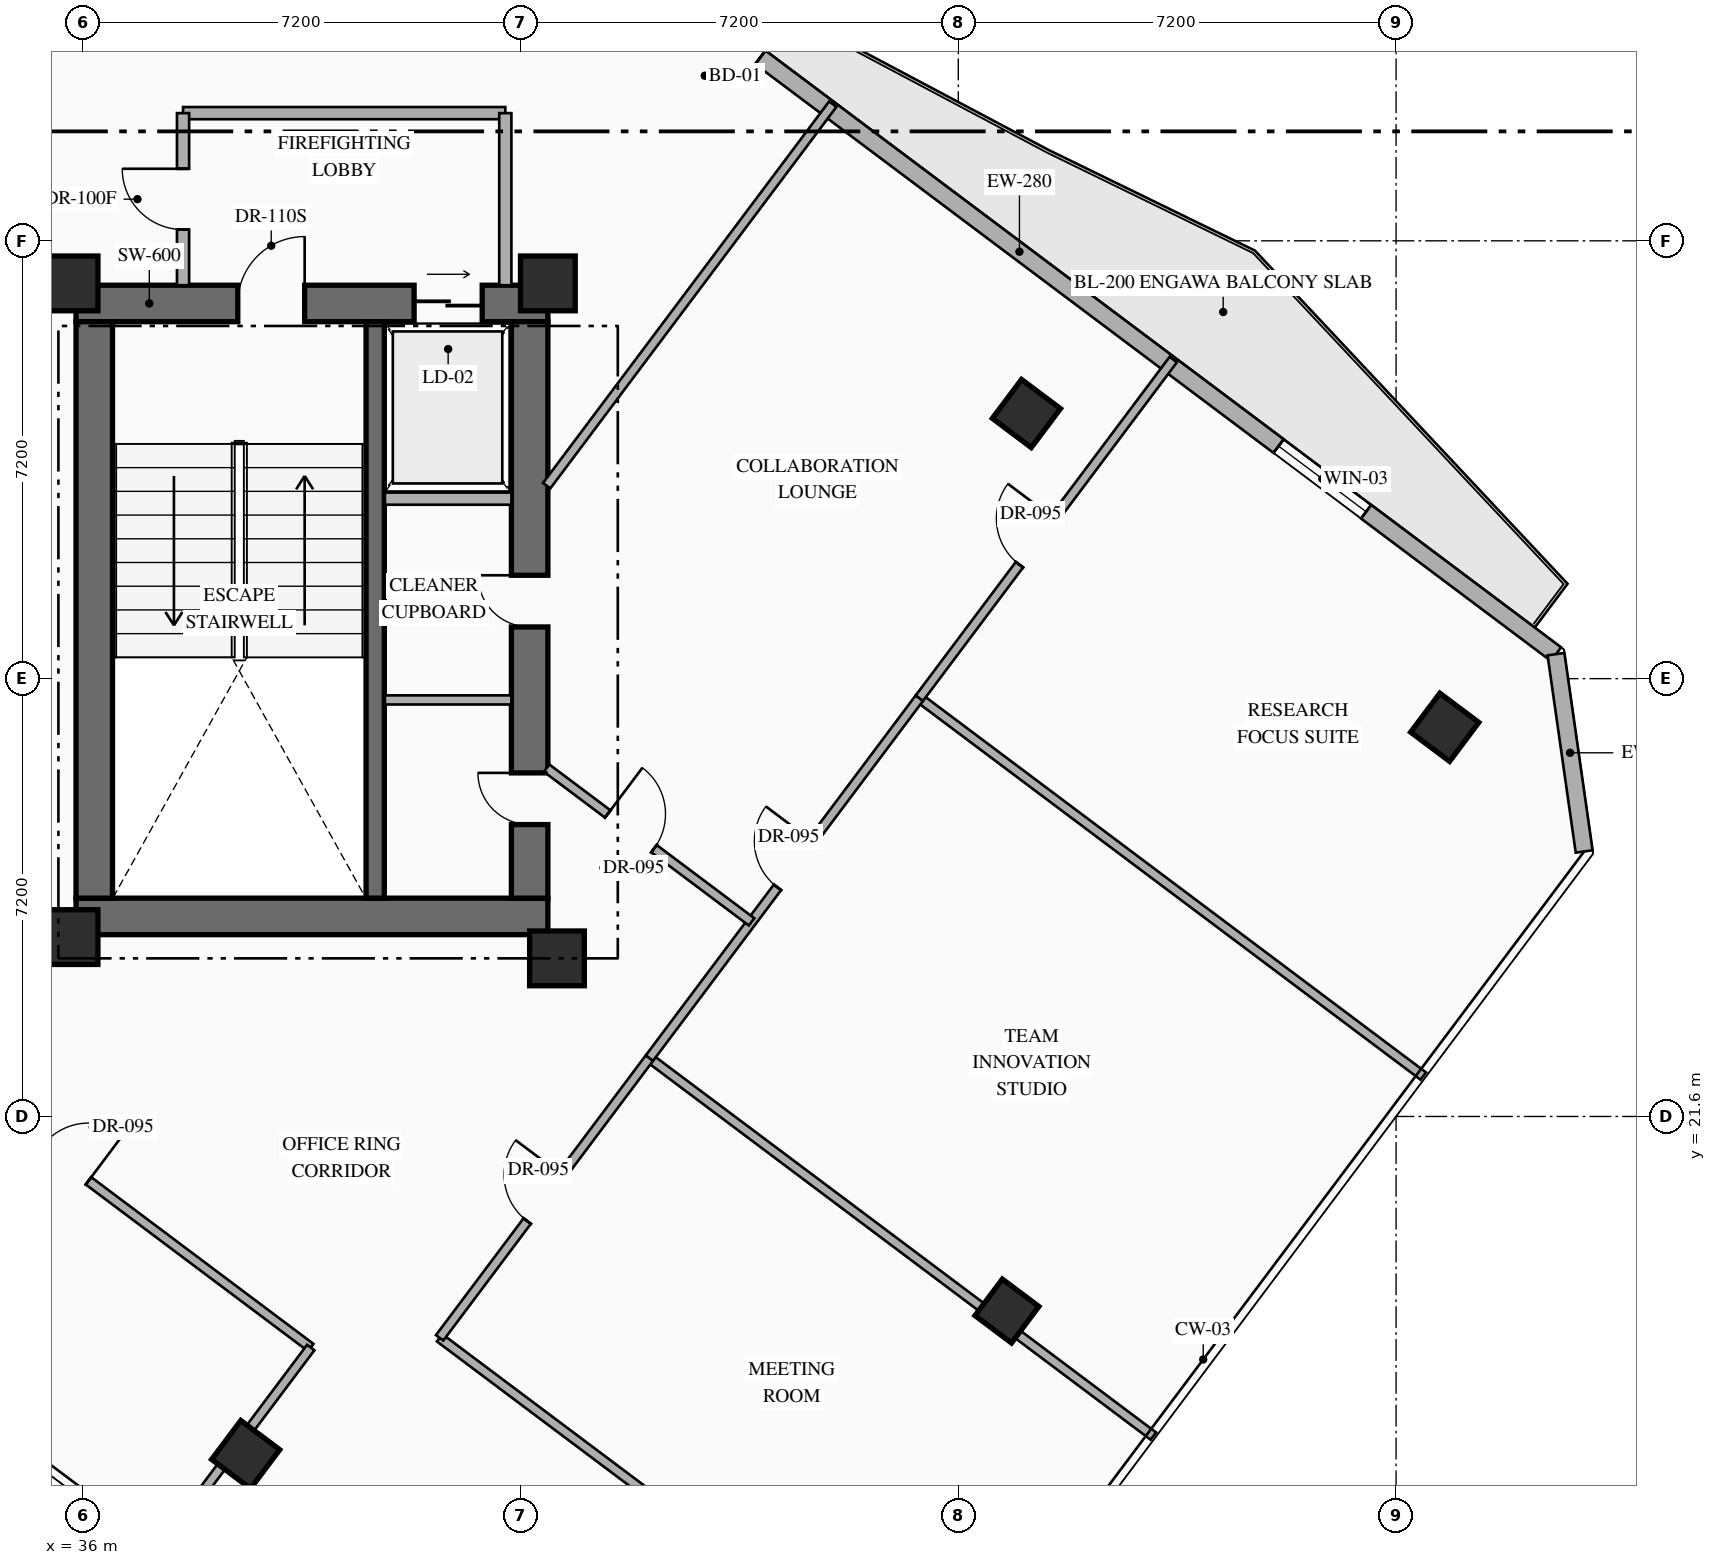
"""IFC4 building model, lengths in metres.
Left out: names, types, materials, properties, quantities, classifications, styles, units other than length and angle.
Written with IfcOpenShell. Run it as: python <this file> out.ifc"""

import sys

from ifc_helpers import new_model, si_unit, direction, frame, frame_2d, origin, origin_2d, place, context, subcontext, project, spatial, rectangle, hollow_rectangle, extrude, element, fill, save


model = new_model("IFC4")
c1 = context("Model", 3, precision=1e-05, world=origin(), true_north=direction((0.0, 1.0)))
c2 = subcontext(c1, "Body", "Model", "MODEL_VIEW")
j1 = project(units=[si_unit("LENGTHUNIT", "METRE"), si_unit("PLANEANGLEUNIT", "RADIAN")], contexts=[c1])
p1 = place(None, origin())
s1 = spatial("IfcSite", under=j1, at=p1, CompositionType="ELEMENT")
p2 = place(p1, origin())
s2 = spatial("IfcBuilding", under=s1, at=p2, CompositionType="ELEMENT")
p3 = place(p2, frame((0.0, 0.0, 178.05)))
s3 = spatial("IfcBuildingStorey", under=s2, at=p3, CompositionType="ELEMENT", Elevation=178.05)
p4 = place(p3, frame((35.89, 24.89, 0.0), z_axis=(0.0, 0.0, 1.0), x_axis=(1.0, 0.0, 0.0)))
e1 = element("IfcWall", 1, at=p4, inside=s3, PredefinedType="SHEAR", context=c2, shape_type="SweptSolid", body=[
    extrude(rectangle(XDim=7.76, YDim=0.6, at=frame_2d((3.88, 0.0))), origin(), (0.0, 0.0, 1.0), 3.6),
])
p5 = place(p3, frame((35.89, 34.97, 0.0), z_axis=(0.0, 0.0, 1.0), x_axis=(1.0, 0.0, 0.0)))
e2 = element("IfcWall", 2, at=p5, inside=s3, PredefinedType="SHEAR", context=c2, shape_type="SweptSolid", body=[
    extrude(rectangle(XDim=7.76, YDim=0.6, at=frame_2d((3.88, 0.0))), origin(), (0.0, 0.0, 1.0), 3.6),
])
p6 = place(p5, frame((2.66, 0.0, 0.0)))
e3 = element("IfcOpeningElement", 3, at=p6, cuts=e2, PredefinedType="OPENING", context=c2, shape_type="SweptSolid", body=[
    extrude(rectangle(XDim=1.1, YDim=2.2, at=frame_2d((0.55, 1.1))), frame((0.0, 0.31, 0.0), z_axis=(0.0, -1.0, 0.0), x_axis=(1.0, 0.0, 0.0)), (0.0, 0.0, 1.0), 0.62),
])
p7 = place(p5, frame((5.56, 0.0, 0.0)))
e4 = element("IfcOpeningElement", 4, at=p7, cuts=e2, PredefinedType="OPENING", context=c2, shape_type="SweptSolid", body=[
    extrude(rectangle(XDim=1.12, YDim=2.15, at=frame_2d((0.56, 1.075))), frame((0.0, 0.31, 0.0), z_axis=(0.0, -1.0, 0.0), x_axis=(1.0, 0.0, 0.0)), (0.0, 0.0, 1.0), 0.62),
])
p8 = place(p3, frame((36.19, 25.19, 0.0), z_axis=(0.0, 0.0, 1.0), x_axis=(0.0, 1.0, 0.0)))
e5 = element("IfcWall", 5, at=p8, inside=s3, PredefinedType="SHEAR", context=c2, shape_type="SweptSolid", body=[
    extrude(rectangle(XDim=9.48, YDim=0.6, at=frame_2d((4.74, 0.0))), origin(), (0.0, 0.0, 1.0), 3.6),
])
p9 = place(p3, frame((43.35, 25.19, 0.0), z_axis=(0.0, 0.0, 1.0), x_axis=(0.0, 1.0, 0.0)))
e6 = element("IfcWall", 6, at=p9, inside=s3, PredefinedType="SHEAR", context=c2, shape_type="SweptSolid", body=[
    extrude(rectangle(XDim=9.48, YDim=0.6, at=frame_2d((4.74, 0.0))), origin(), (0.0, 0.0, 1.0), 3.6),
])
p10 = place(p9, frame((1.21, 0.0, 0.0)))
e7 = element("IfcOpeningElement", 7, at=p10, cuts=e6, PredefinedType="OPENING", context=c2, shape_type="SweptSolid", body=[
    extrude(rectangle(XDim=0.85, YDim=2.08, at=frame_2d((0.425, 1.04))), frame((0.0, 0.31, 0.0), z_axis=(0.0, -1.0, 0.0), x_axis=(1.0, 0.0, 0.0)), (0.0, 0.0, 1.0), 0.62),
])
p11 = place(p9, frame((4.46, 0.0, 0.0)))
e8 = element("IfcOpeningElement", 8, at=p11, cuts=e6, PredefinedType="OPENING", context=c2, shape_type="SweptSolid", body=[
    extrude(rectangle(XDim=0.85, YDim=2.08, at=frame_2d((0.425, 1.04))), frame((0.0, 0.31, 0.0), z_axis=(0.0, -1.0, 0.0), x_axis=(1.0, 0.0, 0.0)), (0.0, 0.0, 1.0), 0.62),
])
p12 = place(p3, frame((40.81, 25.19, 0.0), z_axis=(0.0, 0.0, 1.0), x_axis=(0.0, 1.0, 0.0)))
e9 = element("IfcWall", 9, at=p12, inside=s3, PredefinedType="SHEAR", context=c2, shape_type="SweptSolid", body=[
    extrude(rectangle(XDim=9.48, YDim=0.3, at=frame_2d((4.74, 0.0))), origin(), (0.0, 0.0, 1.0), 3.6),
])
for number, where, z_axis, x_axis in (
    (10, (35.8, 24.55, 0.0), (0.0, 0.0, 1.0), (1.0, 0.0, 0.0)),
    (11, (43.8, 24.2, 0.0), (0.0, 0.0, 1.0), (1.0, 0.0, 0.0)),
    (12, (35.8, 35.3, 0.0), (0.0, 0.0, 1.0), (1.0, 0.0, 0.0)),
    (13, (43.65, 35.3, 0.0), (0.0, 0.0, 1.0), (1.0, 0.0, 0.0)),
):
    element("IfcColumn", number, at=place(p3, frame(where, z_axis=z_axis, x_axis=x_axis)), inside=s3, PredefinedType="COLUMN", context=c2, shape_type="SweptSolid", body=[
        extrude(rectangle(XDim=0.9, YDim=0.9, at=origin_2d()), origin(), (0.0, 0.0, 1.0), 3.6),
    ])
for number, where, z_axis, x_axis in (
    (14, (38.68, 16.04, 0.0), (0.0, 0.0, 1.0), (0.8, -0.6, 0.0)),
    (15, (51.52, 33.16, 0.0), (0.0, 0.0, 1.0), (0.8, -0.6, 0.0)),
    (16, (58.4, 28.0, 0.0), (0.0, 0.0, 1.0), (0.8, -0.6, 0.0)),
):
    element("IfcColumn", number, at=place(p3, frame(where, z_axis=z_axis, x_axis=x_axis)), inside=s3, PredefinedType="COLUMN", context=c2, shape_type="SweptSolid", body=[
        extrude(hollow_rectangle(XDim=0.8, YDim=0.8, WallThickness=0.032, at=origin_2d()), origin(), (0.0, 0.0, 1.0), 3.6),
    ])
p13 = place(p3, frame((51.2, 18.4, 0.0), z_axis=(0.0, 0.0, 1.0), x_axis=(0.799999996291, -0.600000004945, 0.0)))
e17 = element("IfcColumn", 17, at=p13, inside=s3, PredefinedType="COLUMN", context=c2, shape_type="SweptSolid", body=[
    extrude(hollow_rectangle(XDim=0.75, YDim=0.75, WallThickness=0.028, at=origin_2d()), origin(), (0.0, 0.0, 1.0), 3.6),
])
p14 = place(p3, frame((44.86, 40.73, 0.0), z_axis=(0.0, 0.0, 1.0), x_axis=(0.800007624502, -0.599989833863, 0.0)))
e18 = element("IfcWall", 18, at=p14, inside=s3, PredefinedType="STANDARD", context=c2, shape_type="SweptSolid", body=[
    extrude(rectangle(XDim=19.212, YDim=0.28, at=frame_2d((9.606, 0.0))), origin(), (0.0, 0.0, 1.0), 3.3),
])
p15 = place(p14, frame((1.755, 0.0, 0.0)))
e19 = element("IfcOpeningElement", 19, at=p15, cuts=e18, PredefinedType="OPENING", context=c2, shape_type="SweptSolid", body=[
    extrude(rectangle(XDim=1.1, YDim=2.2, at=frame_2d((0.55, 1.1))), frame((0.0, 0.15, 0.0), z_axis=(0.0, -1.0, 0.0), x_axis=(1.0, 0.0, 0.0)), (0.0, 0.0, 1.0), 0.3),
])
p16 = place(p14, frame((13.509, 0.0, 0.85)))
e20 = element("IfcOpeningElement", 20, at=p16, cuts=e18, PredefinedType="OPENING", context=c2, shape_type="SweptSolid", body=[
    extrude(rectangle(XDim=1.8, YDim=2.1, at=frame_2d((0.9, 1.05))), frame((0.0, 0.15, 0.0), z_axis=(0.0, -1.0, 0.0), x_axis=(1.0, 0.0, 0.0)), (0.0, 0.0, 1.0), 0.3),
])
p17 = place(p3, frame((60.23, 29.203, 0.0), z_axis=(0.0, 0.0, 1.0), x_axis=(0.141296221922, -0.989967361922, 0.0)))
e21 = element("IfcWall", 21, at=p17, inside=s3, PredefinedType="STANDARD", context=c2, shape_type="SweptSolid", body=[
    extrude(rectangle(XDim=3.278, YDim=0.28, at=frame_2d((1.639, 0.0))), origin(), (0.0, 0.0, 1.0), 3.3),
])
p18 = place(p3, frame((40.97, 31.76, 0.0), z_axis=(0.0, 0.0, 1.0), x_axis=(1.0, 0.0, 0.0)))
e22 = element("IfcWall", 22, at=p18, inside=s3, PredefinedType="STANDARD", context=c2, shape_type="SweptSolid", body=[
    extrude(rectangle(XDim=2.08, YDim=0.2, at=frame_2d((1.04, 0.0))), origin(), (0.0, 0.0, 1.0), 3.3),
])
p19 = place(p3, frame((40.97, 28.45, 0.0), z_axis=(0.0, 0.0, 1.0), x_axis=(1.0, 0.0, 0.0)))
e23 = element("IfcWall", 23, at=p19, inside=s3, PredefinedType="PARTITIONING", context=c2, shape_type="SweptSolid", body=[
    extrude(rectangle(XDim=2.08, YDim=0.15, at=frame_2d((1.04, 0.0))), origin(), (0.0, 0.0, 1.0), 3.3),
])
p20 = place(p3, frame((37.65, 38.1, 0.0), z_axis=(0.0, 0.0, 1.0), x_axis=(1.0, 0.0, 0.0)))
e24 = element("IfcWall", 24, at=p20, inside=s3, PredefinedType="STANDARD", context=c2, shape_type="SweptSolid", body=[
    extrude(rectangle(XDim=5.3, YDim=0.2, at=frame_2d((2.65, 0.0))), origin(), (0.0, 0.0, 1.0), 3.3),
])
p21 = place(p3, frame((42.95, 35.27, 0.0), z_axis=(0.0, 0.0, 1.0), x_axis=(0.0, 1.0, 0.0)))
e25 = element("IfcWall", 25, at=p21, inside=s3, PredefinedType="STANDARD", context=c2, shape_type="SweptSolid", body=[
    extrude(rectangle(XDim=2.83, YDim=0.2, at=frame_2d((1.415, 0.0))), origin(), (0.0, 0.0, 1.0), 3.3),
])
p22 = place(p3, frame((37.65, 35.27, 0.0), z_axis=(0.0, 0.0, 1.0), x_axis=(0.0, 1.0, 0.0)))
e26 = element("IfcWall", 26, at=p22, inside=s3, PredefinedType="STANDARD", context=c2, shape_type="SweptSolid", body=[
    extrude(rectangle(XDim=2.83, YDim=0.2, at=frame_2d((1.415, 0.0))), origin(), (0.0, 0.0, 1.0), 3.3),
])
p23 = place(p22, frame((0.915, 0.0, 0.0)))
e27 = element("IfcOpeningElement", 27, at=p23, cuts=e26, PredefinedType="OPENING", context=c2, shape_type="SweptSolid", body=[
    extrude(rectangle(XDim=1.0, YDim=2.2, at=frame_2d((0.5, 1.1))), frame((0.0, 0.11, 0.0), z_axis=(0.0, -1.0, 0.0), x_axis=(1.0, 0.0, 0.0)), (0.0, 0.0, 1.0), 0.22),
])
p24 = place(p3, frame((41.87, 17.96, 0.0), z_axis=(0.0, 0.0, 1.0), x_axis=(0.799991516197, -0.600011311571, 0.0)))
e28 = element("IfcWall", 28, at=p24, inside=s3, PredefinedType="PARTITIONING", context=c2, shape_type="SweptSolid", body=[
    extrude(rectangle(XDim=10.36, YDim=0.15, at=frame_2d((5.18, 0.0))), origin(), (0.0, 0.0, 1.0), 3.3),
])
p25 = place(p3, frame((45.32, 22.56, 0.0), z_axis=(0.0, 0.0, 1.0), x_axis=(0.799991516197, -0.600011311571, 0.0)))
e29 = element("IfcWall", 29, at=p25, inside=s3, PredefinedType="PARTITIONING", context=c2, shape_type="SweptSolid", body=[
    extrude(rectangle(XDim=10.36, YDim=0.15, at=frame_2d((5.18, 0.0))), origin(), (0.0, 0.0, 1.0), 2.645),
])
p26 = place(p3, frame((41.87, 17.96, 0.0), z_axis=(0.0, 0.0, 1.0), x_axis=(0.599986413072, 0.800010190015, 0.0)))
e30 = element("IfcWall", 30, at=p26, inside=s3, PredefinedType="PARTITIONING", context=c2, shape_type="SweptSolid", body=[
    extrude(rectangle(XDim=5.75, YDim=0.15, at=frame_2d((2.875, 0.0))), origin(), (0.0, 0.0, 1.0), 3.3),
])
p27 = place(p26, frame((2.4, 0.0, 0.0)))
e31 = element("IfcOpeningElement", 31, at=p27, cuts=e30, PredefinedType="OPENING", context=c2, shape_type="SweptSolid", body=[
    extrude(rectangle(XDim=0.95, YDim=2.15, at=frame_2d((0.475, 1.075))), frame((0.0, 0.085, 0.0), z_axis=(0.0, -1.0, 0.0), x_axis=(1.0, 0.0, 0.0)), (0.0, 0.0, 1.0), 0.17),
])
p28 = place(p3, frame((49.76, 28.48, 0.0), z_axis=(0.0, 0.0, 1.0), x_axis=(0.8, -0.6, 0.0)))
e32 = element("IfcWall", 32, at=p28, inside=s3, PredefinedType="PARTITIONING", context=c2, shape_type="SweptSolid", body=[
    extrude(rectangle(XDim=10.36, YDim=0.15, at=frame_2d((5.18, 0.0))), origin(), (0.0, 0.0, 1.0), 3.3),
])
p29 = place(p3, frame((45.32, 22.56, 0.0), z_axis=(0.0, 0.0, 1.0), x_axis=(0.6, 0.8, 0.0)))
e33 = element("IfcWall", 33, at=p29, inside=s3, PredefinedType="PARTITIONING", context=c2, shape_type="SweptSolid", body=[
    extrude(rectangle(XDim=7.4, YDim=0.15, at=frame_2d((3.7, 0.0))), origin(), (0.0, 0.0, 1.0), 3.3),
])
p30 = place(p29, frame((3.51, 0.0, 0.0)))
e34 = element("IfcOpeningElement", 34, at=p30, cuts=e33, PredefinedType="OPENING", context=c2, shape_type="SweptSolid", body=[
    extrude(rectangle(XDim=0.95, YDim=2.15, at=frame_2d((0.475, 1.075))), frame((0.0, 0.085, 0.0), z_axis=(0.0, -1.0, 0.0), x_axis=(1.0, 0.0, 0.0)), (0.0, 0.0, 1.0), 0.17),
])
p31 = place(p3, frame((49.76, 28.48, 0.0), z_axis=(0.0, 0.0, 1.0), x_axis=(0.599994387644, 0.800004209236, 0.0)))
e35 = element("IfcWall", 35, at=p31, inside=s3, PredefinedType="PARTITIONING", context=c2, shape_type="SweptSolid", body=[
    extrude(rectangle(XDim=6.96, YDim=0.15, at=frame_2d((3.48, 0.0))), origin(), (0.0, 0.0, 1.0), 3.3),
])
p32 = place(p31, frame((2.743, 0.0, 0.0)))
e36 = element("IfcOpeningElement", 36, at=p32, cuts=e35, PredefinedType="OPENING", context=c2, shape_type="SweptSolid", body=[
    extrude(rectangle(XDim=0.95, YDim=2.15, at=frame_2d((0.475, 1.075))), frame((0.0, 0.085, 0.0), z_axis=(0.0, -1.0, 0.0), x_axis=(1.0, 0.0, 0.0)), (0.0, 0.0, 1.0), 0.17),
])
p33 = place(p3, frame((43.63, 27.328, 0.0), z_axis=(0.0, 0.0, 1.0), x_axis=(0.799972182084, -0.600037088764, 0.0)))
e37 = element("IfcWall", 37, at=p33, inside=s3, PredefinedType="PARTITIONING", context=c2, shape_type="SweptSolid", body=[
    extrude(rectangle(XDim=4.213, YDim=0.15, at=frame_2d((2.106, 0.0))), origin(), (0.0, 0.0, 1.0), 2.995),
])
p34 = place(p33, frame((1.256, 0.0, 0.0)))
e38 = element("IfcOpeningElement", 38, at=p34, cuts=e37, PredefinedType="OPENING", context=c2, shape_type="SweptSolid", body=[
    extrude(rectangle(XDim=0.95, YDim=2.15, at=frame_2d((0.475, 1.075))), frame((0.0, 0.085, 0.0), z_axis=(0.0, -1.0, 0.0), x_axis=(1.0, 0.0, 0.0)), (0.0, 0.0, 1.0), 0.17),
])
p35 = place(p3, frame((43.63, 31.973, 0.0), z_axis=(0.0, 0.0, 1.0), x_axis=(0.599975099311, 0.800018674911, 0.0)))
e39 = element("IfcWall", 39, at=p35, inside=s3, PredefinedType="PARTITIONING", context=c2, shape_type="SweptSolid", body=[
    extrude(rectangle(XDim=7.844, YDim=0.15, at=frame_2d((3.922, 0.0))), origin(), (0.0, 0.0, 1.0), 3.3),
])
p36 = place(p3, frame((27.91, 26.68, 0.0), z_axis=(0.0, 0.0, 1.0), x_axis=(0.800005938517, -0.599992081896, 0.0)))
e40 = element("IfcWall", 40, at=p36, inside=s3, PredefinedType="PARTITIONING", context=c2, shape_type="SweptSolid", body=[
    extrude(rectangle(XDim=14.8, YDim=0.15, at=frame_2d((7.4, 0.0))), origin(), (0.0, 0.0, 1.0), 3.3),
])
p37 = place(p36, frame((9.281, 0.0, 0.0)))
e41 = element("IfcOpeningElement", 41, at=p37, cuts=e40, PredefinedType="OPENING", context=c2, shape_type="SweptSolid", body=[
    extrude(rectangle(XDim=0.95, YDim=2.15, at=frame_2d((0.475, 1.075))), frame((0.0, 0.085, 0.0), z_axis=(0.0, -1.0, 0.0), x_axis=(1.0, 0.0, 0.0)), (0.0, 0.0, 1.0), 0.17),
])
p38 = place(p3, frame((37.224, 14.432, 0.0), z_axis=(0.0, 0.0, 1.0), x_axis=(0.599962885857, 0.800027834262, 0.0)))
e42 = element("IfcWall", 42, at=p38, inside=s3, PredefinedType="PARTITIONING", context=c2, shape_type="SweptSolid", body=[
    extrude(rectangle(XDim=4.21, YDim=0.15, at=frame_2d((2.105, 0.0))), origin(), (0.0, 0.0, 1.0), 2.645),
])
p39 = place(p15, origin())
e43 = element("IfcDoor", 43, at=p39, inside=s3, OperationType="SINGLE_SWING_LEFT", PredefinedType="DOOR", context=c2, shape_type="SweptSolid", body=[
    extrude(rectangle(XDim=1.1, YDim=2.2, at=frame_2d((0.55, 1.1))), frame((0.0, 0.025, 0.0), z_axis=(0.0, -1.0, 0.0), x_axis=(1.0, 0.0, 0.0)), (0.0, 0.0, 1.0), 0.05),
])
fill(e19, e43)
p40 = place(p16, origin())
e44 = element("IfcWindow", 44, at=p40, inside=s3, PartitioningType="SINGLE_PANEL", PredefinedType="WINDOW", context=c2, shape_type="SweptSolid", body=[
    extrude(rectangle(XDim=1.8, YDim=2.1, at=frame_2d((0.9, 1.05))), frame((0.0, 0.03, 0.0), z_axis=(0.0, -1.0, 0.0), x_axis=(1.0, 0.0, 0.0)), (0.0, 0.0, 1.0), 0.06),
])
fill(e20, e44)
p41 = place(p6, origin())
e45 = element("IfcDoor", 45, at=p41, inside=s3, OperationType="SINGLE_SWING_RIGHT", PredefinedType="DOOR", context=c2, shape_type="SweptSolid", body=[
    extrude(rectangle(XDim=1.1, YDim=2.2, at=frame_2d((0.55, 1.1))), frame((0.0, 0.025, 0.0), z_axis=(0.0, -1.0, 0.0), x_axis=(1.0, 0.0, 0.0)), (0.0, 0.0, 1.0), 0.05),
])
fill(e3, e45)
p42 = place(p7, origin())
e46 = element("IfcDoor", 46, at=p42, inside=s3, OperationType="SLIDING_TO_RIGHT", PredefinedType="USERDEFINED", context=c2, shape_type="SweptSolid", body=[
    extrude(rectangle(XDim=1.12, YDim=2.15, at=frame_2d((0.56, 1.075))), frame((0.0, 0.025, 0.0), z_axis=(0.0, -1.0, 0.0), x_axis=(1.0, 0.0, 0.0)), (0.0, 0.0, 1.0), 0.05),
])
fill(e4, e46)
p43 = place(p10, origin())
e47 = element("IfcDoor", 47, at=p43, inside=s3, OperationType="SINGLE_SWING_RIGHT", PredefinedType="DOOR", context=c2, shape_type="SweptSolid", body=[
    extrude(rectangle(XDim=0.85, YDim=2.08, at=frame_2d((0.425, 1.04))), frame((0.0, 0.025, 0.0), z_axis=(0.0, -1.0, 0.0), x_axis=(1.0, 0.0, 0.0)), (0.0, 0.0, 1.0), 0.05),
])
fill(e7, e47)
p44 = place(p11, origin())
e48 = element("IfcDoor", 48, at=p44, inside=s3, OperationType="SINGLE_SWING_RIGHT", PredefinedType="DOOR", context=c2, shape_type="SweptSolid", body=[
    extrude(rectangle(XDim=0.85, YDim=2.08, at=frame_2d((0.425, 1.04))), frame((0.0, 0.025, 0.0), z_axis=(0.0, -1.0, 0.0), x_axis=(1.0, 0.0, 0.0)), (0.0, 0.0, 1.0), 0.05),
])
fill(e8, e48)
p45 = place(p23, origin())
e49 = element("IfcDoor", 49, at=p45, inside=s3, OperationType="SINGLE_SWING_RIGHT", PredefinedType="DOOR", context=c2, shape_type="SweptSolid", body=[
    extrude(rectangle(XDim=1.0, YDim=2.2, at=frame_2d((0.5, 1.1))), frame((0.0, 0.025, 0.0), z_axis=(0.0, -1.0, 0.0), x_axis=(1.0, 0.0, 0.0)), (0.0, 0.0, 1.0), 0.05),
])
fill(e27, e49)
p46 = place(p27, origin())
e50 = element("IfcDoor", 50, at=p46, inside=s3, OperationType="SINGLE_SWING_RIGHT", PredefinedType="DOOR", context=c2, shape_type="SweptSolid", body=[
    extrude(rectangle(XDim=0.95, YDim=2.15, at=frame_2d((0.475, 1.075))), frame((0.0, 0.025, 0.0), z_axis=(0.0, -1.0, 0.0), x_axis=(1.0, 0.0, 0.0)), (0.0, 0.0, 1.0), 0.05),
])
fill(e31, e50)
p47 = place(p30, origin())
e51 = element("IfcDoor", 51, at=p47, inside=s3, OperationType="SINGLE_SWING_RIGHT", PredefinedType="DOOR", context=c2, shape_type="SweptSolid", body=[
    extrude(rectangle(XDim=0.95, YDim=2.15, at=frame_2d((0.475, 1.075))), frame((0.0, 0.025, 0.0), z_axis=(0.0, -1.0, 0.0), x_axis=(1.0, 0.0, 0.0)), (0.0, 0.0, 1.0), 0.05),
])
fill(e34, e51)
p48 = place(p32, origin())
e52 = element("IfcDoor", 52, at=p48, inside=s3, OperationType="SINGLE_SWING_RIGHT", PredefinedType="DOOR", context=c2, shape_type="SweptSolid", body=[
    extrude(rectangle(XDim=0.95, YDim=2.15, at=frame_2d((0.475, 1.075))), frame((0.0, 0.025, 0.0), z_axis=(0.0, -1.0, 0.0), x_axis=(1.0, 0.0, 0.0)), (0.0, 0.0, 1.0), 0.05),
])
fill(e36, e52)
p49 = place(p34, origin())
e53 = element("IfcDoor", 53, at=p49, inside=s3, OperationType="SINGLE_SWING_LEFT", PredefinedType="DOOR", context=c2, shape_type="SweptSolid", body=[
    extrude(rectangle(XDim=0.95, YDim=2.15, at=frame_2d((0.475, 1.075))), frame((0.0, 0.025, 0.0), z_axis=(0.0, -1.0, 0.0), x_axis=(1.0, 0.0, 0.0)), (0.0, 0.0, 1.0), 0.05),
])
fill(e38, e53)
p50 = place(p37, origin())
e54 = element("IfcDoor", 54, at=p50, inside=s3, OperationType="SINGLE_SWING_RIGHT", PredefinedType="DOOR", context=c2, shape_type="SweptSolid", body=[
    extrude(rectangle(XDim=0.95, YDim=2.15, at=frame_2d((0.475, 1.075))), frame((0.0, 0.025, 0.0), z_axis=(0.0, -1.0, 0.0), x_axis=(1.0, 0.0, 0.0)), (0.0, 0.0, 1.0), 0.05),
])
fill(e41, e54)
save(model, sys.argv[1])
